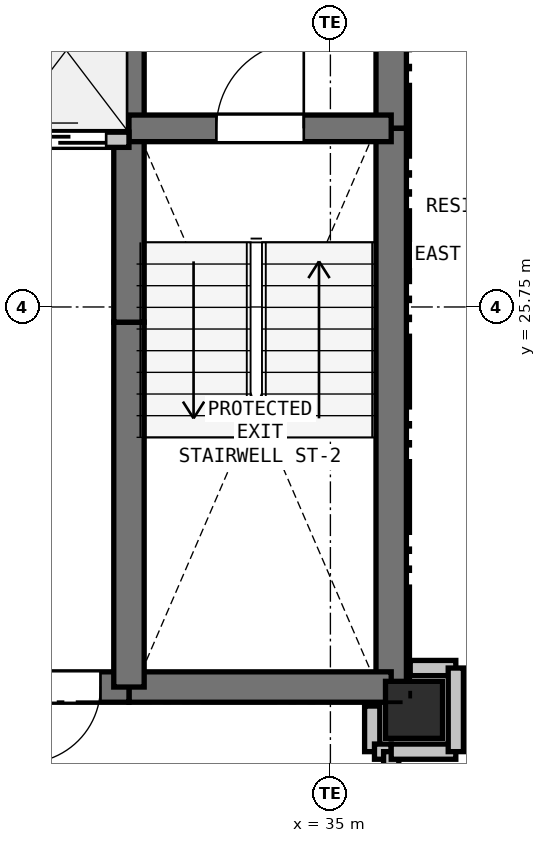
"""IFC4 building model, lengths in metres.
Left out: names, types, materials, properties, quantities, classifications, styles, units other than length and angle.
Written with IfcOpenShell. Run it as: python <this file> out.ifc"""

import sys

from ifc_helpers import new_model, si_unit, direction, frame, frame_2d, origin, origin_2d, place, context, subcontext, project, spatial, rectangle, extrude, element, fill, save


model = new_model("IFC4")
c1 = context("Model", 3, precision=1e-05, world=origin(), true_north=direction((0.0, 1.0)))
c2 = subcontext(c1, "Body", "Model", "MODEL_VIEW")
j1 = project(units=[si_unit("LENGTHUNIT", "METRE"), si_unit("PLANEANGLEUNIT", "RADIAN")], contexts=[c1])
p1 = place(None, origin())
s1 = spatial("IfcSite", under=j1, at=p1, CompositionType="ELEMENT")
p2 = place(p1, origin())
s2 = spatial("IfcBuilding", under=s1, at=p2, CompositionType="ELEMENT")
p3 = place(p2, frame((0.0, 0.0, 109.8)))
s3 = spatial("IfcBuildingStorey", under=s2, at=p3, CompositionType="ELEMENT", Elevation=109.8)
p4 = place(p3, frame((36.1, 20.45, 0.0), z_axis=(0.0, 0.0, 1.0), x_axis=(1.0, 0.0, 0.0)))
e1 = element("IfcColumn", 1, at=p4, inside=s3, PredefinedType="COLUMN", context=c2, shape_type="SweptSolid", body=[
    extrude(rectangle(XDim=0.75, YDim=0.75, at=origin_2d()), origin(), (0.0, 0.0, 1.0), 3.3),
])
p5 = place(p3, frame((35.8, 32.75, 0.0), z_axis=(0.0, 0.0, 1.0), x_axis=(0.0, -1.0, 0.0)))
e2 = element("IfcWall", 2, at=p5, inside=s3, PredefinedType="SHEAR", context=c2, shape_type="SweptSolid", body=[
    extrude(rectangle(XDim=4.65, YDim=0.4, at=frame_2d((2.325, 0.0))), origin(), (0.0, 0.0, 1.0), 3.05),
])
p6 = place(p3, frame((35.8, 28.1, 0.0), z_axis=(0.0, 0.0, 1.0), x_axis=(0.0, -1.0, 0.0)))
e3 = element("IfcWall", 3, at=p6, inside=s3, PredefinedType="SHEAR", context=c2, shape_type="SweptSolid", body=[
    extrude(rectangle(XDim=7.35, YDim=0.4, at=frame_2d((3.675, 0.0))), origin(), (0.0, 0.0, 1.0), 3.05),
])
p7 = place(p3, frame((35.8, 20.75, 0.0), z_axis=(0.0, 0.0, 1.0), x_axis=(-1.0, 0.0, 0.0)))
e4 = element("IfcWall", 4, at=p7, inside=s3, PredefinedType="SHEAR", context=c2, shape_type="SweptSolid", body=[
    extrude(rectangle(XDim=3.45, YDim=0.4, at=frame_2d((1.725, 0.0))), origin(), (0.0, 0.0, 1.0), 3.05),
])
p8 = place(p3, frame((32.35, 20.75, 0.0), z_axis=(0.0, 0.0, 1.0), x_axis=(-1.0, 0.0, 0.0)))
e5 = element("IfcWall", 5, at=p8, inside=s3, PredefinedType="SHEAR", context=c2, shape_type="SweptSolid", body=[
    extrude(rectangle(XDim=1.75, YDim=0.4, at=frame_2d((0.875, 0.0))), origin(), (0.0, 0.0, 1.0), 3.05),
])
p9 = place(p8, frame((0.375, 0.0, 0.0)))
e6 = element("IfcOpeningElement", 6, at=p9, cuts=e5, PredefinedType="OPENING", context=c2, shape_type="SweptSolid", body=[
    extrude(rectangle(XDim=1.0, YDim=2.15, at=frame_2d((0.5, 1.075))), frame((0.0, 0.21, 0.0), z_axis=(0.0, -1.0, 0.0), x_axis=(1.0, 0.0, 0.0)), (0.0, 0.0, 1.0), 0.42),
])
p10 = place(p3, frame((32.35, 20.75, 0.0), z_axis=(0.0, 0.0, 1.0), x_axis=(0.0, 1.0, 0.0)))
e7 = element("IfcWall", 7, at=p10, inside=s3, PredefinedType="SHEAR", context=c2, shape_type="SweptSolid", body=[
    extrude(rectangle(XDim=4.8, YDim=0.4, at=frame_2d((2.4, 0.0))), origin(), (0.0, 0.0, 1.0), 3.05),
])
p11 = place(p3, frame((32.35, 25.55, 0.0), z_axis=(0.0, 0.0, 1.0), x_axis=(0.0, 1.0, 0.0)))
e8 = element("IfcWall", 8, at=p11, inside=s3, PredefinedType="SHEAR", context=c2, shape_type="SweptSolid", body=[
    extrude(rectangle(XDim=2.4, YDim=0.4, at=frame_2d((1.2, 0.0))), origin(), (0.0, 0.0, 1.0), 3.05),
])
p12 = place(p3, frame((32.35, 27.95, 0.0), z_axis=(0.0, 0.0, 1.0), x_axis=(0.0, 1.0, 0.0)))
e9 = element("IfcWall", 9, at=p12, inside=s3, PredefinedType="SHEAR", context=c2, shape_type="SweptSolid", body=[
    extrude(rectangle(XDim=2.8, YDim=0.4, at=frame_2d((1.4, 0.0))), origin(), (0.0, 0.0, 1.0), 3.05),
])
p13 = place(p3, frame((32.35, 28.1, 0.0), z_axis=(0.0, 0.0, 1.0), x_axis=(1.0, 0.0, 0.0)))
e10 = element("IfcWall", 10, at=p13, inside=s3, PredefinedType="SHEAR", context=c2, shape_type="SweptSolid", body=[
    extrude(rectangle(XDim=3.45, YDim=0.35, at=frame_2d((1.725, 0.0))), origin(), (0.0, 0.0, 1.0), 3.05),
])
p14 = place(p13, frame((1.15, 0.0, 0.0)))
e11 = element("IfcOpeningElement", 11, at=p14, cuts=e10, PredefinedType="OPENING", context=c2, shape_type="SweptSolid", body=[
    extrude(rectangle(XDim=1.15, YDim=2.15, at=frame_2d((0.575, 1.075))), frame((0.0, 0.185, 0.0), z_axis=(0.0, -1.0, 0.0), x_axis=(1.0, 0.0, 0.0)), (0.0, 0.0, 1.0), 0.37),
])
p15 = place(p3, frame((27.4, 27.95, 0.0), z_axis=(0.0, 0.0, 1.0), x_axis=(1.0, 0.0, 0.0)))
e12 = element("IfcWall", 12, at=p15, inside=s3, PredefinedType="PARTITIONING", context=c2, shape_type="SweptSolid", body=[
    extrude(rectangle(XDim=4.95, YDim=0.2, at=frame_2d((2.475, 0.0))), origin(), (0.0, 0.0, 1.0), 3.05),
])
p16 = place(p15, frame((0.25, 0.0, 0.0)))
e13 = element("IfcOpeningElement", 13, at=p16, cuts=e12, PredefinedType="OPENING", context=c2, shape_type="SweptSolid", body=[
    extrude(rectangle(XDim=1.1, YDim=2.15, at=frame_2d((0.55, 1.075))), frame((0.0, 0.11, 0.0), z_axis=(0.0, -1.0, 0.0), x_axis=(1.0, 0.0, 0.0)), (0.0, 0.0, 1.0), 0.22),
])
p17 = place(p15, frame((1.9, 0.0, 0.0)))
e14 = element("IfcOpeningElement", 14, at=p17, cuts=e12, PredefinedType="OPENING", context=c2, shape_type="SweptSolid", body=[
    extrude(rectangle(XDim=1.1, YDim=2.15, at=frame_2d((0.55, 1.075))), frame((0.0, 0.11, 0.0), z_axis=(0.0, -1.0, 0.0), x_axis=(1.0, 0.0, 0.0)), (0.0, 0.0, 1.0), 0.22),
])
p18 = place(p15, frame((3.55, 0.0, 0.0)))
e15 = element("IfcOpeningElement", 15, at=p18, cuts=e12, PredefinedType="OPENING", context=c2, shape_type="SweptSolid", body=[
    extrude(rectangle(XDim=1.1, YDim=2.15, at=frame_2d((0.55, 1.075))), frame((0.0, 0.11, 0.0), z_axis=(0.0, -1.0, 0.0), x_axis=(1.0, 0.0, 0.0)), (0.0, 0.0, 1.0), 0.22),
])
p19 = place(p3, frame((35.55, 20.5, 0.0), z_axis=(0.0, 0.0, 1.0), x_axis=(0.0, -1.0, 0.0)))
e16 = element("IfcWall", 16, at=p19, inside=s3, PredefinedType="PARTITIONING", context=c2, shape_type="SweptSolid", body=[
    extrude(rectangle(XDim=0.6, YDim=0.2, at=frame_2d((0.3, 0.0))), origin(), (0.0, 0.0, 1.0), 2.498),
])
p20 = place(p3, frame((35.58, 19.9, 0.0), z_axis=(0.0, 0.0, 1.0), x_axis=(1.0, 0.0, 0.0)))
e17 = element("IfcWall", 17, at=p20, inside=s3, PredefinedType="PARTITIONING", context=c2, shape_type="SweptSolid", body=[
    extrude(rectangle(XDim=0.22, YDim=0.2, at=frame_2d((0.11, 0.0))), origin(), (0.0, 0.0, 1.0), 3.05),
])
p21 = place(p3, frame((35.8, 19.9, 0.0), z_axis=(0.0, 0.0, 1.0), x_axis=(0.0, -1.0, 0.0)))
e18 = element("IfcWall", 18, at=p21, inside=s3, PredefinedType="PARTITIONING", context=c2, shape_type="SweptSolid", body=[
    extrude(rectangle(XDim=1.75, YDim=0.2, at=frame_2d((0.875, 0.0))), origin(), (0.0, 0.0, 1.0), 3.05),
])
p22 = place(p21, frame((0.375, 0.0, 0.0)))
e19 = element("IfcOpeningElement", 19, at=p22, cuts=e18, PredefinedType="OPENING", context=c2, shape_type="SweptSolid", body=[
    extrude(rectangle(XDim=1.0, YDim=2.15, at=frame_2d((0.5, 1.075))), frame((0.0, 0.11, 0.0), z_axis=(0.0, -1.0, 0.0), x_axis=(1.0, 0.0, 0.0)), (0.0, 0.0, 1.0), 0.22),
])
p23 = place(p3, frame((36.65, 21.0, 0.0), z_axis=(0.0, 0.0, 1.0), x_axis=(-1.0, 0.0, 0.0)))
e20 = element("IfcWall", 20, at=p23, inside=s3, PredefinedType="PARTITIONING", context=c2, shape_type="SweptSolid", body=[
    extrude(rectangle(XDim=0.6, YDim=0.2, at=frame_2d((0.3, 0.0))), origin(), (0.0, 0.0, 1.0), 2.498),
])
p24 = place(p3, frame((35.8, 19.9, 0.0), z_axis=(0.0, 0.0, 1.0), x_axis=(1.0, 0.0, 0.0)))
e21 = element("IfcWall", 21, at=p24, inside=s3, PredefinedType="PARTITIONING", context=c2, shape_type="SweptSolid", body=[
    extrude(rectangle(XDim=0.85, YDim=0.2, at=frame_2d((0.425, 0.0))), origin(), (0.0, 0.0, 1.0), 2.423),
])
p25 = place(p3, frame((36.65, 19.9, 0.0), z_axis=(0.0, 0.0, 1.0), x_axis=(0.0, 1.0, 0.0)))
e22 = element("IfcWall", 22, at=p25, inside=s3, PredefinedType="PARTITIONING", context=c2, shape_type="SweptSolid", body=[
    extrude(rectangle(XDim=1.1, YDim=0.2, at=frame_2d((0.55, 0.0))), origin(), (0.0, 0.0, 1.0), 3.05),
])
p26 = place(p18, origin())
e23 = element("IfcDoor", 23, at=p26, inside=s3, OperationType="SLIDING_TO_LEFT", PredefinedType="DOOR", context=c2, shape_type="SweptSolid", body=[
    extrude(rectangle(XDim=1.1, YDim=2.15, at=frame_2d((0.55, 1.075))), frame((0.0, 0.025, 0.0), z_axis=(0.0, -1.0, 0.0), x_axis=(1.0, 0.0, 0.0)), (0.0, 0.0, 1.0), 0.05),
])
fill(e15, e23)
p27 = place(p9, origin())
e24 = element("IfcDoor", 24, at=p27, inside=s3, OperationType="SINGLE_SWING_RIGHT", PredefinedType="DOOR", context=c2, shape_type="SweptSolid", body=[
    extrude(rectangle(XDim=1.0, YDim=2.15, at=frame_2d((0.5, 1.075))), frame((0.0, 0.025, 0.0), z_axis=(0.0, -1.0, 0.0), x_axis=(1.0, 0.0, 0.0)), (0.0, 0.0, 1.0), 0.05),
])
fill(e6, e24)
p28 = place(p14, origin())
e25 = element("IfcDoor", 25, at=p28, inside=s3, OperationType="SINGLE_SWING_RIGHT", PredefinedType="DOOR", context=c2, shape_type="SweptSolid", body=[
    extrude(rectangle(XDim=1.15, YDim=2.15, at=frame_2d((0.575, 1.075))), frame((0.0, 0.025, 0.0), z_axis=(0.0, -1.0, 0.0), x_axis=(1.0, 0.0, 0.0)), (0.0, 0.0, 1.0), 0.05),
])
fill(e11, e25)
save(model, sys.argv[1])
